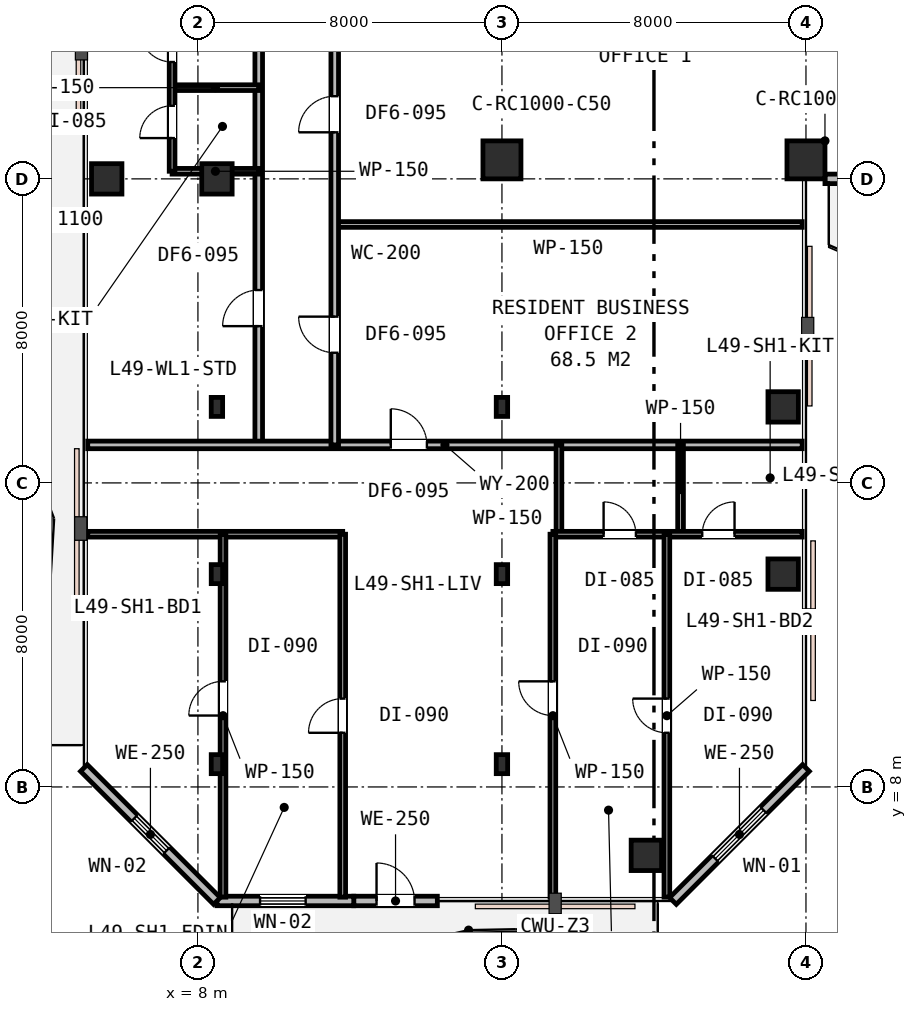
"""IFC4 building model, lengths in metres.
Left out: names, types, materials, properties, quantities, classifications, styles, units other than length and angle.
Written with IfcOpenShell. Run it as: python <this file> out.ifc"""

import sys

from ifc_helpers import new_model, si_unit, direction, frame, frame_2d, origin, origin_2d, place, context, subcontext, project, spatial, rectangle, i_section, extrude, element, fill, save


model = new_model("IFC4")
c1 = context("Model", 3, precision=1e-05, world=origin(), true_north=direction((0.0, 1.0)))
c2 = subcontext(c1, "Body", "Model", "MODEL_VIEW")
j1 = project(units=[si_unit("LENGTHUNIT", "METRE"), si_unit("PLANEANGLEUNIT", "RADIAN")], contexts=[c1])
p1 = place(None, origin())
s1 = spatial("IfcSite", under=j1, at=p1, CompositionType="ELEMENT")
p2 = place(p1, origin())
s2 = spatial("IfcBuilding", under=s1, at=p2, CompositionType="ELEMENT")
p3 = place(p2, frame((0.0, 0.0, 190.2)))
s3 = spatial("IfcBuildingStorey", under=s2, at=p3, CompositionType="ELEMENT", Elevation=190.2)
p4 = place(p3, frame((8.5, 24.0, 0.0), z_axis=(0.0, 0.0, 1.0), x_axis=(1.0, 0.0, 0.0)))
e1 = element("IfcColumn", 1, at=p4, inside=s3, PredefinedType="COLUMN", context=c2, shape_type="SweptSolid", body=[
    extrude(rectangle(XDim=0.8, YDim=0.8, at=origin_2d()), origin(), (0.0, 0.0, 1.0), 3.6),
])
for number, where, z_axis, x_axis in (
    (2, (16.0, 24.5, 0.0), (0.0, 0.0, 1.0), (1.0, 0.0, 0.0)),
    (3, (24.0, 24.5, 0.0), (0.0, 0.0, 1.0), (1.0, 0.0, 0.0)),
):
    element("IfcColumn", number, at=place(p3, frame(where, z_axis=z_axis, x_axis=x_axis)), inside=s3, PredefinedType="COLUMN", context=c2, shape_type="SweptSolid", body=[
        extrude(rectangle(XDim=1.0, YDim=1.0, at=origin_2d()), origin(), (0.0, 0.0, 1.0), 3.6),
    ])
for number, where, z_axis, x_axis in (
    (4, (5.6, 24.0, 0.0), (0.0, 0.0, 1.0), (1.0, 0.0, 0.0)),
    (5, (19.8, 6.2, 0.0), (0.0, 0.0, 1.0), (1.0, 0.0, 0.0)),
    (6, (23.4, 13.6, 0.0), (0.0, 0.0, 1.0), (1.0, 0.0, 0.0)),
    (7, (23.4, 18.0, 0.0), (0.0, 0.0, 1.0), (1.0, 0.0, 0.0)),
):
    element("IfcColumn", number, at=place(p3, frame(where, z_axis=z_axis, x_axis=x_axis)), inside=s3, PredefinedType="COLUMN", context=c2, shape_type="SweptSolid", body=[
        extrude(rectangle(XDim=0.8, YDim=0.8, at=origin_2d()), origin(), (0.0, 0.0, 1.0), 3.6),
    ])
for number, where, z_axis, x_axis in (
    (8, (8.5, 8.6, 0.0), (0.0, 0.0, 1.0), (1.0, 0.0, 0.0)),
    (9, (16.0, 8.6, 0.0), (0.0, 0.0, 1.0), (1.0, 0.0, 0.0)),
    (10, (8.5, 13.6, 0.0), (0.0, 0.0, 1.0), (1.0, 0.0, 0.0)),
    (11, (16.0, 13.6, 0.0), (0.0, 0.0, 1.0), (1.0, 0.0, 0.0)),
    (12, (8.5, 18.0, 0.0), (0.0, 0.0, 1.0), (1.0, 0.0, 0.0)),
    (13, (16.0, 18.0, 0.0), (0.0, 0.0, 1.0), (1.0, 0.0, 0.0)),
):
    element("IfcColumn", number, at=place(p3, frame(where, z_axis=z_axis, x_axis=x_axis)), inside=s3, PredefinedType="COLUMN", context=c2, shape_type="SweptSolid", body=[
        extrude(i_section(OverallWidth=0.3, OverallDepth=0.5, WebThickness=0.015, FlangeThickness=0.028, FilletRadius=0.027, at=origin_2d()), origin(), (0.0, 0.0, 1.0), 3.6),
    ])
p5 = place(p3, frame((12.1, 5.0, 0.0), z_axis=(0.0, 0.0, 1.0), x_axis=(1.0, 0.0, 0.0)))
e14 = element("IfcWall", 14, at=p5, inside=s3, PredefinedType="STANDARD", context=c2, shape_type="SweptSolid", body=[
    extrude(rectangle(XDim=2.2, YDim=0.25, at=frame_2d((1.1, 0.0))), origin(), (0.0, 0.0, 1.0), 3.33),
])
p6 = place(p5, frame((0.6, 0.0, 0.0)))
e15 = element("IfcOpeningElement", 15, at=p6, cuts=e14, PredefinedType="OPENING", context=c2, shape_type="SweptSolid", body=[
    extrude(rectangle(XDim=1.0, YDim=2.15, at=frame_2d((0.5, 1.075))), frame((0.0, 0.135, 0.0), z_axis=(0.0, -1.0, 0.0), x_axis=(1.0, 0.0, 0.0)), (0.0, 0.0, 1.0), 0.27),
])
p7 = place(p3, frame((8.5, 5.0, 0.0), z_axis=(0.0, 0.0, 1.0), x_axis=(1.0, 0.0, 0.0)))
e16 = element("IfcWall", 16, at=p7, inside=s3, PredefinedType="STANDARD", context=c2, shape_type="SweptSolid", body=[
    extrude(rectangle(XDim=3.6, YDim=0.25, at=frame_2d((1.8, 0.0))), origin(), (0.0, 0.0, 1.0), 3.33),
])
p8 = place(p7, frame((1.135, 0.0, 0.85)))
e17 = element("IfcOpeningElement", 17, at=p8, cuts=e16, PredefinedType="OPENING", context=c2, shape_type="SweptSolid", body=[
    extrude(rectangle(XDim=1.2, YDim=1.6, at=frame_2d((0.6, 0.8))), frame((0.0, 0.135, 0.0), z_axis=(0.0, -1.0, 0.0), x_axis=(1.0, 0.0, 0.0)), (0.0, 0.0, 1.0), 0.27),
])
p9 = place(p3, frame((20.5, 5.0, 0.0), z_axis=(0.0, 0.0, 1.0), x_axis=(0.707106781187, 0.707106781187, 0.0)))
e18 = element("IfcWall", 18, at=p9, inside=s3, PredefinedType="STANDARD", context=c2, shape_type="SweptSolid", body=[
    extrude(rectangle(XDim=4.95, YDim=0.25, at=frame_2d((2.475, 0.0))), origin(), (0.0, 0.0, 1.0), 3.33),
])
p10 = place(p9, frame((1.575, 0.0, 0.75)))
e19 = element("IfcOpeningElement", 19, at=p10, cuts=e18, PredefinedType="OPENING", context=c2, shape_type="SweptSolid", body=[
    extrude(rectangle(XDim=1.8, YDim=1.85, at=frame_2d((0.9, 0.925))), frame((0.0, 0.135, 0.0), z_axis=(0.0, -1.0, 0.0), x_axis=(1.0, 0.0, 0.0)), (0.0, 0.0, 1.0), 0.27),
])
p11 = place(p3, frame((24.5, 24.0, 0.0), z_axis=(0.0, 0.0, 1.0), x_axis=(1.0, 0.0, 0.0)))
e20 = element("IfcWall", 20, at=p11, inside=s3, PredefinedType="STANDARD", context=c2, shape_type="SweptSolid", body=[
    extrude(rectangle(XDim=1.35, YDim=0.25, at=frame_2d((0.675, 0.0))), origin(), (0.0, 0.0, 1.0), 3.02),
])
p12 = place(p3, frame((5.0, 8.5, 0.0), z_axis=(0.0, 0.0, 1.0), x_axis=(0.707106781187, -0.707106781187, 0.0)))
e21 = element("IfcWall", 21, at=p12, inside=s3, PredefinedType="STANDARD", context=c2, shape_type="SweptSolid", body=[
    extrude(rectangle(XDim=4.95, YDim=0.25, at=frame_2d((2.475, 0.0))), origin(), (0.0, 0.0, 1.0), 3.33),
])
p13 = place(p12, frame((1.875, 0.0, 0.85)))
e22 = element("IfcOpeningElement", 22, at=p13, cuts=e21, PredefinedType="OPENING", context=c2, shape_type="SweptSolid", body=[
    extrude(rectangle(XDim=1.2, YDim=1.6, at=frame_2d((0.6, 0.8))), frame((0.0, 0.135, 0.0), z_axis=(0.0, -1.0, 0.0), x_axis=(1.0, 0.0, 0.0)), (0.0, 0.0, 1.0), 0.27),
])
p14 = place(p3, frame((9.6, 17.0, 0.0), z_axis=(0.0, 0.0, 1.0), x_axis=(0.0, 1.0, 0.0)))
e23 = element("IfcWall", 23, at=p14, inside=s3, PredefinedType="PARTITIONING", context=c2, shape_type="SweptSolid", body=[
    extrude(rectangle(XDim=25.9, YDim=0.2, at=frame_2d((12.95, 0.0))), origin(), (0.0, 0.0, 1.0), 2.92),
])
p15 = place(p14, frame((12.045, 0.0, 0.0)))
e24 = element("IfcOpeningElement", 24, at=p15, cuts=e23, PredefinedType="OPENING", context=c2, shape_type="SweptSolid", body=[
    extrude(rectangle(XDim=0.95, YDim=2.15, at=frame_2d((0.475, 1.075))), frame((0.0, 0.11, 0.0), z_axis=(0.0, -1.0, 0.0), x_axis=(1.0, 0.0, 0.0)), (0.0, 0.0, 1.0), 0.22),
])
p16 = place(p14, frame((3.125, 0.0, 0.0)))
e25 = element("IfcOpeningElement", 25, at=p16, cuts=e23, PredefinedType="OPENING", context=c2, shape_type="SweptSolid", body=[
    extrude(rectangle(XDim=0.95, YDim=2.15, at=frame_2d((0.475, 1.075))), frame((0.0, 0.11, 0.0), z_axis=(0.0, -1.0, 0.0), x_axis=(1.0, 0.0, 0.0)), (0.0, 0.0, 1.0), 0.22),
])
p17 = place(p3, frame((5.1, 17.0, 0.0), z_axis=(0.0, 0.0, 1.0), x_axis=(1.0, 0.0, 0.0)))
e26 = element("IfcWall", 26, at=p17, inside=s3, PredefinedType="PARTITIONING", context=c2, shape_type="SweptSolid", body=[
    extrude(rectangle(XDim=18.8, YDim=0.2, at=frame_2d((9.4, 0.0))), origin(), (0.0, 0.0, 1.0), 2.92),
])
p18 = place(p17, frame((7.975, 0.0, 0.0)))
e27 = element("IfcOpeningElement", 27, at=p18, cuts=e26, PredefinedType="OPENING", context=c2, shape_type="SweptSolid", body=[
    extrude(rectangle(XDim=0.95, YDim=2.15, at=frame_2d((0.475, 1.075))), frame((0.0, 0.11, 0.0), z_axis=(0.0, -1.0, 0.0), x_axis=(1.0, 0.0, 0.0)), (0.0, 0.0, 1.0), 0.22),
])
for number, where, z_axis, x_axis in (
    (28, (7.32, 24.2, 0.0), (0.0, 0.0, 1.0), (1.0, 0.0, 0.0)),
    (29, (7.32, 26.4, 0.0), (0.0, 0.0, 1.0), (1.0, 0.0, 0.0)),
):
    element("IfcWall", number, at=place(p3, frame(where, z_axis=z_axis, x_axis=x_axis)), inside=s3, PredefinedType="PARTITIONING", context=c2, shape_type="SweptSolid", body=[
        extrude(rectangle(XDim=2.28, YDim=0.15, at=frame_2d((1.14, 0.0))), origin(), (0.0, 0.0, 1.0), 2.92),
    ])
p19 = place(p3, frame((7.32, 24.2, 0.0), z_axis=(0.0, 0.0, 1.0), x_axis=(0.0, 1.0, 0.0)))
e30 = element("IfcWall", 30, at=p19, inside=s3, PredefinedType="PARTITIONING", context=c2, shape_type="SweptSolid", body=[
    extrude(rectangle(XDim=4.4, YDim=0.15, at=frame_2d((2.2, 0.0))), origin(), (0.0, 0.0, 1.0), 2.92),
])
p20 = place(p19, frame((0.873, 0.0, 0.0)))
e31 = element("IfcOpeningElement", 31, at=p20, cuts=e30, PredefinedType="OPENING", context=c2, shape_type="SweptSolid", body=[
    extrude(rectangle(XDim=0.85, YDim=2.15, at=frame_2d((0.425, 1.075))), frame((0.0, 0.085, 0.0), z_axis=(0.0, -1.0, 0.0), x_axis=(1.0, 0.0, 0.0)), (0.0, 0.0, 1.0), 0.17),
])
p21 = place(p19, frame((2.875, 0.0, 0.0)))
e32 = element("IfcOpeningElement", 32, at=p21, cuts=e30, PredefinedType="OPENING", context=c2, shape_type="SweptSolid", body=[
    extrude(rectangle(XDim=0.85, YDim=2.15, at=frame_2d((0.425, 1.075))), frame((0.0, 0.085, 0.0), z_axis=(0.0, -1.0, 0.0), x_axis=(1.0, 0.0, 0.0)), (0.0, 0.0, 1.0), 0.17),
])
p22 = place(p3, frame((11.6, 22.8, 0.0), z_axis=(0.0, 0.0, 1.0), x_axis=(1.0, 0.0, 0.0)))
e33 = element("IfcWall", 33, at=p22, inside=s3, PredefinedType="PARTITIONING", context=c2, shape_type="SweptSolid", body=[
    extrude(rectangle(XDim=12.3, YDim=0.15, at=frame_2d((6.15, 0.0))), origin(), (0.0, 0.0, 1.0), 2.92),
])
p23 = place(p3, frame((11.6, 17.0, 0.0), z_axis=(0.0, 0.0, 1.0), x_axis=(0.0, 1.0, 0.0)))
e34 = element("IfcWall", 34, at=p23, inside=s3, PredefinedType="PARTITIONING", context=c2, shape_type="SweptSolid", body=[
    extrude(rectangle(XDim=11.6, YDim=0.2, at=frame_2d((5.8, 0.0))), origin(), (0.0, 0.0, 1.0), 2.92),
])
p24 = place(p23, frame((8.225, 0.0, 0.0)))
e35 = element("IfcOpeningElement", 35, at=p24, cuts=e34, PredefinedType="OPENING", context=c2, shape_type="SweptSolid", body=[
    extrude(rectangle(XDim=0.95, YDim=2.15, at=frame_2d((0.475, 1.075))), frame((0.0, 0.11, 0.0), z_axis=(0.0, -1.0, 0.0), x_axis=(1.0, 0.0, 0.0)), (0.0, 0.0, 1.0), 0.22),
])
p25 = place(p23, frame((2.425, 0.0, 0.0)))
e36 = element("IfcOpeningElement", 36, at=p25, cuts=e34, PredefinedType="OPENING", context=c2, shape_type="SweptSolid", body=[
    extrude(rectangle(XDim=0.95, YDim=2.15, at=frame_2d((0.475, 1.075))), frame((0.0, 0.11, 0.0), z_axis=(0.0, -1.0, 0.0), x_axis=(1.0, 0.0, 0.0)), (0.0, 0.0, 1.0), 0.22),
])
p26 = place(p3, frame((17.5, 14.65, 0.0), z_axis=(0.0, 0.0, 1.0), x_axis=(0.0, 1.0, 0.0)))
e37 = element("IfcWall", 37, at=p26, inside=s3, PredefinedType="PARTITIONING", context=c2, shape_type="SweptSolid", body=[
    extrude(rectangle(XDim=2.35, YDim=0.15, at=frame_2d((1.175, 0.0))), origin(), (0.0, 0.0, 1.0), 3.33),
])
p27 = place(p3, frame((20.7, 14.65, 0.0), z_axis=(0.0, 0.0, 1.0), x_axis=(0.0, 1.0, 0.0)))
e38 = element("IfcWall", 38, at=p27, inside=s3, PredefinedType="PARTITIONING", context=c2, shape_type="SweptSolid", body=[
    extrude(rectangle(XDim=2.35, YDim=0.15, at=frame_2d((1.175, 0.0))), origin(), (0.0, 0.0, 1.0), 3.07),
])
p28 = place(p3, frame((17.34, 14.65, 0.0), z_axis=(0.0, 0.0, 1.0), x_axis=(1.0, 0.0, 0.0)))
e39 = element("IfcWall", 39, at=p28, inside=s3, PredefinedType="PARTITIONING", context=c2, shape_type="SweptSolid", body=[
    extrude(rectangle(XDim=6.56, YDim=0.15, at=frame_2d((3.28, 0.0))), origin(), (0.0, 0.0, 1.0), 3.02),
])
p29 = place(p28, frame((1.335, 0.0, 0.0)))
e40 = element("IfcOpeningElement", 40, at=p29, cuts=e39, PredefinedType="OPENING", context=c2, shape_type="SweptSolid", body=[
    extrude(rectangle(XDim=0.85, YDim=2.15, at=frame_2d((0.425, 1.075))), frame((0.0, 0.085, 0.0), z_axis=(0.0, -1.0, 0.0), x_axis=(1.0, 0.0, 0.0)), (0.0, 0.0, 1.0), 0.17),
])
p30 = place(p28, frame((3.93, 0.0, 0.0)))
e41 = element("IfcOpeningElement", 41, at=p30, cuts=e39, PredefinedType="OPENING", context=c2, shape_type="SweptSolid", body=[
    extrude(rectangle(XDim=0.85, YDim=2.15, at=frame_2d((0.425, 1.075))), frame((0.0, 0.085, 0.0), z_axis=(0.0, -1.0, 0.0), x_axis=(1.0, 0.0, 0.0)), (0.0, 0.0, 1.0), 0.17),
])
p31 = place(p3, frame((5.1, 14.65, 0.0), z_axis=(0.0, 0.0, 1.0), x_axis=(1.0, 0.0, 0.0)))
e42 = element("IfcWall", 42, at=p31, inside=s3, PredefinedType="PARTITIONING", context=c2, shape_type="SweptSolid", body=[
    extrude(rectangle(XDim=6.71, YDim=0.15, at=frame_2d((3.355, 0.0))), origin(), (0.0, 0.0, 1.0), 2.92),
])
p32 = place(p3, frame((8.66, 5.1, 0.0), z_axis=(0.0, 0.0, 1.0), x_axis=(0.0, 1.0, 0.0)))
e43 = element("IfcWall", 43, at=p32, inside=s3, PredefinedType="PARTITIONING", context=c2, shape_type="SweptSolid", body=[
    extrude(rectangle(XDim=9.55, YDim=0.15, at=frame_2d((4.775, 0.0))), origin(), (0.0, 0.0, 1.0), 2.92),
])
p33 = place(p32, frame((4.779, 0.0, 0.0)))
e44 = element("IfcOpeningElement", 44, at=p33, cuts=e43, PredefinedType="OPENING", context=c2, shape_type="SweptSolid", body=[
    extrude(rectangle(XDim=0.9, YDim=2.15, at=frame_2d((0.45, 1.075))), frame((0.0, 0.085, 0.0), z_axis=(0.0, -1.0, 0.0), x_axis=(1.0, 0.0, 0.0)), (0.0, 0.0, 1.0), 0.17),
])
p34 = place(p3, frame((20.34, 5.1, 0.0), z_axis=(0.0, 0.0, 1.0), x_axis=(0.0, 1.0, 0.0)))
e45 = element("IfcWall", 45, at=p34, inside=s3, PredefinedType="PARTITIONING", context=c2, shape_type="SweptSolid", body=[
    extrude(rectangle(XDim=9.55, YDim=0.15, at=frame_2d((4.775, 0.0))), origin(), (0.0, 0.0, 1.0), 2.92),
])
p35 = place(p34, frame((4.325, 0.0, 0.0)))
e46 = element("IfcOpeningElement", 46, at=p35, cuts=e45, PredefinedType="OPENING", context=c2, shape_type="SweptSolid", body=[
    extrude(rectangle(XDim=0.9, YDim=2.15, at=frame_2d((0.45, 1.075))), frame((0.0, 0.085, 0.0), z_axis=(0.0, -1.0, 0.0), x_axis=(1.0, 0.0, 0.0)), (0.0, 0.0, 1.0), 0.17),
])
p36 = place(p3, frame((17.34, 5.1, 0.0), z_axis=(0.0, 0.0, 1.0), x_axis=(0.0, 1.0, 0.0)))
e47 = element("IfcWall", 47, at=p36, inside=s3, PredefinedType="PARTITIONING", context=c2, shape_type="SweptSolid", body=[
    extrude(rectangle(XDim=9.55, YDim=0.15, at=frame_2d((4.775, 0.0))), origin(), (0.0, 0.0, 1.0), 2.92),
])
p37 = place(p36, frame((4.779, 0.0, 0.0)))
e48 = element("IfcOpeningElement", 48, at=p37, cuts=e47, PredefinedType="OPENING", context=c2, shape_type="SweptSolid", body=[
    extrude(rectangle(XDim=0.9, YDim=2.15, at=frame_2d((0.45, 1.075))), frame((0.0, 0.085, 0.0), z_axis=(0.0, -1.0, 0.0), x_axis=(1.0, 0.0, 0.0)), (0.0, 0.0, 1.0), 0.17),
])
p38 = place(p3, frame((11.81, 5.1, 0.0), z_axis=(0.0, 0.0, 1.0), x_axis=(0.0, 1.0, 0.0)))
e49 = element("IfcWall", 49, at=p38, inside=s3, PredefinedType="PARTITIONING", context=c2, shape_type="SweptSolid", body=[
    extrude(rectangle(XDim=9.55, YDim=0.15, at=frame_2d((4.775, 0.0))), origin(), (0.0, 0.0, 1.0), 2.92),
])
p39 = place(p38, frame((4.325, 0.0, 0.0)))
e50 = element("IfcOpeningElement", 50, at=p39, cuts=e49, PredefinedType="OPENING", context=c2, shape_type="SweptSolid", body=[
    extrude(rectangle(XDim=0.9, YDim=2.15, at=frame_2d((0.45, 1.075))), frame((0.0, 0.085, 0.0), z_axis=(0.0, -1.0, 0.0), x_axis=(1.0, 0.0, 0.0)), (0.0, 0.0, 1.0), 0.17),
])
p40 = place(p6, origin())
e51 = element("IfcDoor", 51, at=p40, inside=s3, OperationType="SINGLE_SWING_LEFT", PredefinedType="DOOR", context=c2, shape_type="SweptSolid", body=[
    extrude(rectangle(XDim=1.0, YDim=2.15, at=frame_2d((0.5, 1.075))), frame((0.0, 0.025, 0.0), z_axis=(0.0, -1.0, 0.0), x_axis=(1.0, 0.0, 0.0)), (0.0, 0.0, 1.0), 0.05),
])
fill(e15, e51)
p41 = place(p8, origin())
e52 = element("IfcWindow", 52, at=p41, inside=s3, PartitioningType="SINGLE_PANEL", PredefinedType="WINDOW", context=c2, shape_type="SweptSolid", body=[
    extrude(rectangle(XDim=1.2, YDim=1.6, at=frame_2d((0.6, 0.8))), frame((0.0, 0.03, 0.0), z_axis=(0.0, -1.0, 0.0), x_axis=(1.0, 0.0, 0.0)), (0.0, 0.0, 1.0), 0.06),
])
fill(e17, e52)
p42 = place(p10, origin())
e53 = element("IfcWindow", 53, at=p42, inside=s3, PartitioningType="SINGLE_PANEL", PredefinedType="WINDOW", context=c2, shape_type="SweptSolid", body=[
    extrude(rectangle(XDim=1.8, YDim=1.85, at=frame_2d((0.9, 0.925))), frame((0.0, 0.03, 0.0), z_axis=(0.0, -1.0, 0.0), x_axis=(1.0, 0.0, 0.0)), (0.0, 0.0, 1.0), 0.06),
])
fill(e19, e53)
p43 = place(p13, origin())
e54 = element("IfcWindow", 54, at=p43, inside=s3, PartitioningType="SINGLE_PANEL", PredefinedType="WINDOW", context=c2, shape_type="SweptSolid", body=[
    extrude(rectangle(XDim=1.2, YDim=1.6, at=frame_2d((0.6, 0.8))), frame((0.0, 0.03, 0.0), z_axis=(0.0, -1.0, 0.0), x_axis=(1.0, 0.0, 0.0)), (0.0, 0.0, 1.0), 0.06),
])
fill(e22, e54)
p44 = place(p16, origin())
e55 = element("IfcDoor", 55, at=p44, inside=s3, OperationType="SINGLE_SWING_LEFT", PredefinedType="DOOR", context=c2, shape_type="SweptSolid", body=[
    extrude(rectangle(XDim=0.95, YDim=2.15, at=frame_2d((0.475, 1.075))), frame((0.0, 0.025, 0.0), z_axis=(0.0, -1.0, 0.0), x_axis=(1.0, 0.0, 0.0)), (0.0, 0.0, 1.0), 0.05),
])
fill(e25, e55)
p45 = place(p20, origin())
e56 = element("IfcDoor", 56, at=p45, inside=s3, OperationType="SINGLE_SWING_LEFT", PredefinedType="DOOR", context=c2, shape_type="SweptSolid", body=[
    extrude(rectangle(XDim=0.85, YDim=2.15, at=frame_2d((0.425, 1.075))), frame((0.0, 0.025, 0.0), z_axis=(0.0, -1.0, 0.0), x_axis=(1.0, 0.0, 0.0)), (0.0, 0.0, 1.0), 0.05),
])
fill(e31, e56)
p46 = place(p21, origin())
e57 = element("IfcDoor", 57, at=p46, inside=s3, OperationType="SINGLE_SWING_RIGHT", PredefinedType="DOOR", context=c2, shape_type="SweptSolid", body=[
    extrude(rectangle(XDim=0.85, YDim=2.15, at=frame_2d((0.425, 1.075))), frame((0.0, 0.025, 0.0), z_axis=(0.0, -1.0, 0.0), x_axis=(1.0, 0.0, 0.0)), (0.0, 0.0, 1.0), 0.05),
])
fill(e32, e57)
p47 = place(p24, origin())
e58 = element("IfcDoor", 58, at=p47, inside=s3, OperationType="SINGLE_SWING_LEFT", PredefinedType="DOOR", context=c2, shape_type="SweptSolid", body=[
    extrude(rectangle(XDim=0.95, YDim=2.15, at=frame_2d((0.475, 1.075))), frame((0.0, 0.025, 0.0), z_axis=(0.0, -1.0, 0.0), x_axis=(1.0, 0.0, 0.0)), (0.0, 0.0, 1.0), 0.05),
])
fill(e35, e58)
p48 = place(p25, origin())
e59 = element("IfcDoor", 59, at=p48, inside=s3, OperationType="SINGLE_SWING_RIGHT", PredefinedType="DOOR", context=c2, shape_type="SweptSolid", body=[
    extrude(rectangle(XDim=0.95, YDim=2.15, at=frame_2d((0.475, 1.075))), frame((0.0, 0.025, 0.0), z_axis=(0.0, -1.0, 0.0), x_axis=(1.0, 0.0, 0.0)), (0.0, 0.0, 1.0), 0.05),
])
fill(e36, e59)
p49 = place(p18, origin())
e60 = element("IfcDoor", 60, at=p49, inside=s3, OperationType="SINGLE_SWING_LEFT", PredefinedType="DOOR", context=c2, shape_type="SweptSolid", body=[
    extrude(rectangle(XDim=0.95, YDim=2.15, at=frame_2d((0.475, 1.075))), frame((0.0, 0.025, 0.0), z_axis=(0.0, -1.0, 0.0), x_axis=(1.0, 0.0, 0.0)), (0.0, 0.0, 1.0), 0.05),
])
fill(e27, e60)
p50 = place(p29, origin())
e61 = element("IfcDoor", 61, at=p50, inside=s3, OperationType="SINGLE_SWING_LEFT", PredefinedType="DOOR", context=c2, shape_type="SweptSolid", body=[
    extrude(rectangle(XDim=0.85, YDim=2.15, at=frame_2d((0.425, 1.075))), frame((0.0, 0.025, 0.0), z_axis=(0.0, -1.0, 0.0), x_axis=(1.0, 0.0, 0.0)), (0.0, 0.0, 1.0), 0.05),
])
fill(e40, e61)
p51 = place(p30, origin())
e62 = element("IfcDoor", 62, at=p51, inside=s3, OperationType="SINGLE_SWING_RIGHT", PredefinedType="DOOR", context=c2, shape_type="SweptSolid", body=[
    extrude(rectangle(XDim=0.85, YDim=2.15, at=frame_2d((0.425, 1.075))), frame((0.0, 0.025, 0.0), z_axis=(0.0, -1.0, 0.0), x_axis=(1.0, 0.0, 0.0)), (0.0, 0.0, 1.0), 0.05),
])
fill(e41, e62)
p52 = place(p33, origin())
e63 = element("IfcDoor", 63, at=p52, inside=s3, OperationType="SINGLE_SWING_LEFT", PredefinedType="DOOR", context=c2, shape_type="SweptSolid", body=[
    extrude(rectangle(XDim=0.9, YDim=2.15, at=frame_2d((0.45, 1.075))), frame((0.0, 0.025, 0.0), z_axis=(0.0, -1.0, 0.0), x_axis=(1.0, 0.0, 0.0)), (0.0, 0.0, 1.0), 0.05),
])
fill(e44, e63)
p53 = place(p35, origin())
e64 = element("IfcDoor", 64, at=p53, inside=s3, OperationType="SINGLE_SWING_RIGHT", PredefinedType="DOOR", context=c2, shape_type="SweptSolid", body=[
    extrude(rectangle(XDim=0.9, YDim=2.15, at=frame_2d((0.45, 1.075))), frame((0.0, 0.025, 0.0), z_axis=(0.0, -1.0, 0.0), x_axis=(1.0, 0.0, 0.0)), (0.0, 0.0, 1.0), 0.05),
])
fill(e46, e64)
p54 = place(p37, origin())
e65 = element("IfcDoor", 65, at=p54, inside=s3, OperationType="SINGLE_SWING_RIGHT", PredefinedType="DOOR", context=c2, shape_type="SweptSolid", body=[
    extrude(rectangle(XDim=0.9, YDim=2.15, at=frame_2d((0.45, 1.075))), frame((0.0, 0.025, 0.0), z_axis=(0.0, -1.0, 0.0), x_axis=(1.0, 0.0, 0.0)), (0.0, 0.0, 1.0), 0.05),
])
fill(e48, e65)
p55 = place(p39, origin())
e66 = element("IfcDoor", 66, at=p55, inside=s3, OperationType="SINGLE_SWING_LEFT", PredefinedType="DOOR", context=c2, shape_type="SweptSolid", body=[
    extrude(rectangle(XDim=0.9, YDim=2.15, at=frame_2d((0.45, 1.075))), frame((0.0, 0.025, 0.0), z_axis=(0.0, -1.0, 0.0), x_axis=(1.0, 0.0, 0.0)), (0.0, 0.0, 1.0), 0.05),
])
fill(e50, e66)
save(model, sys.argv[1])
